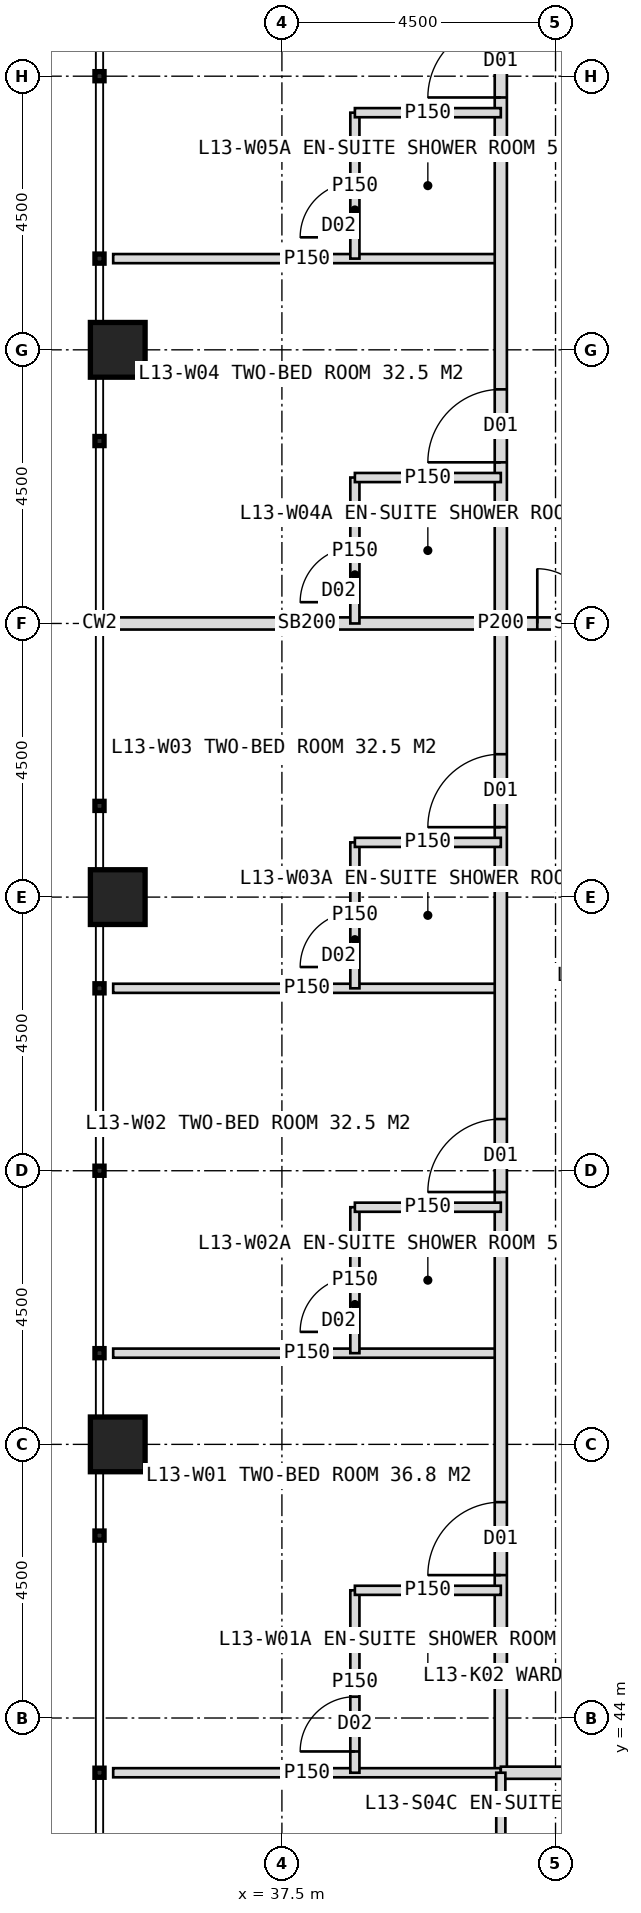
"""IFC4 building model, lengths in metres.
Left out: names, types, materials, properties, quantities, classifications, styles, units other than length and angle.
Written with IfcOpenShell. Run it as: python <this file> out.ifc"""

import sys

from ifc_helpers import new_model, si_unit, direction, frame, frame_2d, origin, origin_2d, place, context, subcontext, project, spatial, rectangle, hollow_rectangle, extrude, element, fill, save


model = new_model("IFC4")
c1 = context("Model", 3, precision=1e-05, world=origin(), true_north=direction((0.0, 1.0)))
c2 = subcontext(c1, "Body", "Model", "MODEL_VIEW")
j1 = project(units=[si_unit("LENGTHUNIT", "METRE"), si_unit("PLANEANGLEUNIT", "RADIAN")], contexts=[c1])
p1 = place(None, origin())
s1 = spatial("IfcSite", under=j1, at=p1, CompositionType="ELEMENT")
p2 = place(p1, origin())
s2 = spatial("IfcBuilding", under=s1, at=p2, CompositionType="ELEMENT")
p3 = place(p2, frame((0.0, 0.0, 59.0)))
s3 = spatial("IfcBuildingStorey", under=s2, at=p3, CompositionType="ELEMENT", Elevation=59.0)
for number, where, z_axis, x_axis in (
    (1, (34.8, 48.5, 0.0), (0.0, 0.0, 1.0), (1.0, 0.0, 0.0)),
    (2, (34.8, 57.5, 0.0), (0.0, 0.0, 1.0), (1.0, 0.0, 0.0)),
    (3, (34.8, 66.5, 0.0), (0.0, 0.0, 1.0), (1.0, 0.0, 0.0)),
):
    element("IfcColumn", number, at=place(p3, frame(where, z_axis=z_axis, x_axis=x_axis)), inside=s3, PredefinedType="COLUMN", context=c2, shape_type="SweptSolid", body=[
        extrude(hollow_rectangle(XDim=0.9, YDim=0.9, WallThickness=0.08, at=origin_2d()), origin(), (0.0, 0.0, 1.0), 4.0),
    ])
for number, where, z_axis, x_axis in (
    (4, (41.1, 50.0, 0.0), (0.0, 0.0, 1.0), (-1.0, 0.0, 0.0)),
    (5, (41.1, 56.0, 0.0), (0.0, 0.0, 1.0), (-1.0, 0.0, 0.0)),
):
    element("IfcWall", number, at=place(p3, frame(where, z_axis=z_axis, x_axis=x_axis)), inside=s3, PredefinedType="PARTITIONING", context=c2, shape_type="SweptSolid", body=[
        extrude(rectangle(XDim=6.375, YDim=0.15, at=frame_2d((3.188, 0.0))), origin(), (0.0, 0.0, 1.0), 3.75),
    ])
p4 = place(p3, frame((41.1, 62.0, 0.0), z_axis=(0.0, 0.0, 1.0), x_axis=(-1.0, 0.0, 0.0)))
e6 = element("IfcWall", 6, at=p4, inside=s3, PredefinedType="SOLIDWALL", context=c2, shape_type="SweptSolid", body=[
    extrude(rectangle(XDim=6.375, YDim=0.2, at=frame_2d((3.188, 0.0))), origin(), (0.0, 0.0, 1.0), 2.75),
])
p5 = place(p3, frame((41.1, 68.0, 0.0), z_axis=(0.0, 0.0, 1.0), x_axis=(-1.0, 0.0, 0.0)))
e7 = element("IfcWall", 7, at=p5, inside=s3, PredefinedType="PARTITIONING", context=c2, shape_type="SweptSolid", body=[
    extrude(rectangle(XDim=6.375, YDim=0.15, at=frame_2d((3.188, 0.0))), origin(), (0.0, 0.0, 1.0), 3.75),
])
p6 = place(p3, frame((41.1, 43.1, 0.0), z_axis=(0.0, 0.0, 1.0), x_axis=(0.0, 1.0, 0.0)))
e8 = element("IfcWall", 8, at=p6, inside=s3, PredefinedType="PARTITIONING", context=c2, shape_type="SweptSolid", body=[
    extrude(rectangle(XDim=37.8, YDim=0.2, at=frame_2d((18.9, 0.0))), origin(), (0.0, 0.0, 1.0), 3.75),
])
p7 = place(p6, frame((3.25, 0.0, 0.0)))
e9 = element("IfcOpeningElement", 9, at=p7, cuts=e8, PredefinedType="OPENING", context=c2, shape_type="SweptSolid", body=[
    extrude(rectangle(XDim=1.2, YDim=2.2, at=frame_2d((0.6, 1.1))), frame((0.0, 0.11, 0.0), z_axis=(0.0, -1.0, 0.0), x_axis=(1.0, 0.0, 0.0)), (0.0, 0.0, 1.0), 0.22),
])
p8 = place(p6, frame((9.55, 0.0, 0.0)))
e10 = element("IfcOpeningElement", 10, at=p8, cuts=e8, PredefinedType="OPENING", context=c2, shape_type="SweptSolid", body=[
    extrude(rectangle(XDim=1.2, YDim=2.2, at=frame_2d((0.6, 1.1))), frame((0.0, 0.11, 0.0), z_axis=(0.0, -1.0, 0.0), x_axis=(1.0, 0.0, 0.0)), (0.0, 0.0, 1.0), 0.22),
])
p9 = place(p6, frame((15.55, 0.0, 0.0)))
e11 = element("IfcOpeningElement", 11, at=p9, cuts=e8, PredefinedType="OPENING", context=c2, shape_type="SweptSolid", body=[
    extrude(rectangle(XDim=1.2, YDim=2.2, at=frame_2d((0.6, 1.1))), frame((0.0, 0.11, 0.0), z_axis=(0.0, -1.0, 0.0), x_axis=(1.0, 0.0, 0.0)), (0.0, 0.0, 1.0), 0.22),
])
p10 = place(p6, frame((21.55, 0.0, 0.0)))
e12 = element("IfcOpeningElement", 12, at=p10, cuts=e8, PredefinedType="OPENING", context=c2, shape_type="SweptSolid", body=[
    extrude(rectangle(XDim=1.2, YDim=2.2, at=frame_2d((0.6, 1.1))), frame((0.0, 0.11, 0.0), z_axis=(0.0, -1.0, 0.0), x_axis=(1.0, 0.0, 0.0)), (0.0, 0.0, 1.0), 0.22),
])
p11 = place(p6, frame((27.55, 0.0, 0.0)))
e13 = element("IfcOpeningElement", 13, at=p11, cuts=e8, PredefinedType="OPENING", context=c2, shape_type="SweptSolid", body=[
    extrude(rectangle(XDim=1.2, YDim=2.2, at=frame_2d((0.6, 1.1))), frame((0.0, 0.11, 0.0), z_axis=(0.0, -1.0, 0.0), x_axis=(1.0, 0.0, 0.0)), (0.0, 0.0, 1.0), 0.22),
])
p12 = place(p3, frame((41.1, 43.1, 0.0), z_axis=(0.0, 0.0, 1.0), x_axis=(-1.0, 0.0, 0.0)))
e14 = element("IfcWall", 14, at=p12, inside=s3, PredefinedType="PARTITIONING", context=c2, shape_type="SweptSolid", body=[
    extrude(rectangle(XDim=6.375, YDim=0.15, at=frame_2d((3.188, 0.0))), origin(), (0.0, 0.0, 1.0), 3.75),
])
p13 = place(p3, frame((38.7, 43.1, 0.0), z_axis=(0.0, 0.0, 1.0), x_axis=(0.0, 1.0, 0.0)))
e15 = element("IfcWall", 15, at=p13, inside=s3, PredefinedType="PARTITIONING", context=c2, shape_type="SweptSolid", body=[
    extrude(rectangle(XDim=3.0, YDim=0.15, at=frame_2d((1.5, 0.0))), origin(), (0.0, 0.0, 1.0), 3.75),
])
p14 = place(p13, frame((0.35, 0.0, 0.0)))
e16 = element("IfcOpeningElement", 16, at=p14, cuts=e15, PredefinedType="OPENING", context=c2, shape_type="SweptSolid", body=[
    extrude(rectangle(XDim=0.9, YDim=2.1, at=frame_2d((0.45, 1.05))), frame((0.0, 0.085, 0.0), z_axis=(0.0, -1.0, 0.0), x_axis=(1.0, 0.0, 0.0)), (0.0, 0.0, 1.0), 0.17),
])
p15 = place(p3, frame((41.1, 46.1, 0.0), z_axis=(0.0, 0.0, 1.0), x_axis=(-1.0, 0.0, 0.0)))
e17 = element("IfcWall", 17, at=p15, inside=s3, PredefinedType="PARTITIONING", context=c2, shape_type="SweptSolid", body=[
    extrude(rectangle(XDim=2.4, YDim=0.15, at=frame_2d((1.2, 0.0))), origin(), (0.0, 0.0, 1.0), 3.75),
])
p16 = place(p3, frame((38.7, 50.0, 0.0), z_axis=(0.0, 0.0, 1.0), x_axis=(0.0, 1.0, 0.0)))
e18 = element("IfcWall", 18, at=p16, inside=s3, PredefinedType="PARTITIONING", context=c2, shape_type="SweptSolid", body=[
    extrude(rectangle(XDim=2.4, YDim=0.15, at=frame_2d((1.2, 0.0))), origin(), (0.0, 0.0, 1.0), 3.75),
])
p17 = place(p16, frame((0.35, 0.0, 0.0)))
e19 = element("IfcOpeningElement", 19, at=p17, cuts=e18, PredefinedType="OPENING", context=c2, shape_type="SweptSolid", body=[
    extrude(rectangle(XDim=0.9, YDim=2.1, at=frame_2d((0.45, 1.05))), frame((0.0, 0.085, 0.0), z_axis=(0.0, -1.0, 0.0), x_axis=(1.0, 0.0, 0.0)), (0.0, 0.0, 1.0), 0.17),
])
p18 = place(p3, frame((41.1, 52.4, 0.0), z_axis=(0.0, 0.0, 1.0), x_axis=(-1.0, 0.0, 0.0)))
e20 = element("IfcWall", 20, at=p18, inside=s3, PredefinedType="PARTITIONING", context=c2, shape_type="SweptSolid", body=[
    extrude(rectangle(XDim=2.4, YDim=0.15, at=frame_2d((1.2, 0.0))), origin(), (0.0, 0.0, 1.0), 3.75),
])
p19 = place(p3, frame((38.7, 56.0, 0.0), z_axis=(0.0, 0.0, 1.0), x_axis=(0.0, 1.0, 0.0)))
e21 = element("IfcWall", 21, at=p19, inside=s3, PredefinedType="PARTITIONING", context=c2, shape_type="SweptSolid", body=[
    extrude(rectangle(XDim=2.4, YDim=0.15, at=frame_2d((1.2, 0.0))), origin(), (0.0, 0.0, 1.0), 3.75),
])
p20 = place(p19, frame((0.35, 0.0, 0.0)))
e22 = element("IfcOpeningElement", 22, at=p20, cuts=e21, PredefinedType="OPENING", context=c2, shape_type="SweptSolid", body=[
    extrude(rectangle(XDim=0.9, YDim=2.1, at=frame_2d((0.45, 1.05))), frame((0.0, 0.085, 0.0), z_axis=(0.0, -1.0, 0.0), x_axis=(1.0, 0.0, 0.0)), (0.0, 0.0, 1.0), 0.17),
])
p21 = place(p3, frame((41.1, 58.4, 0.0), z_axis=(0.0, 0.0, 1.0), x_axis=(-1.0, 0.0, 0.0)))
e23 = element("IfcWall", 23, at=p21, inside=s3, PredefinedType="PARTITIONING", context=c2, shape_type="SweptSolid", body=[
    extrude(rectangle(XDim=2.4, YDim=0.15, at=frame_2d((1.2, 0.0))), origin(), (0.0, 0.0, 1.0), 3.75),
])
p22 = place(p3, frame((38.7, 62.0, 0.0), z_axis=(0.0, 0.0, 1.0), x_axis=(0.0, 1.0, 0.0)))
e24 = element("IfcWall", 24, at=p22, inside=s3, PredefinedType="PARTITIONING", context=c2, shape_type="SweptSolid", body=[
    extrude(rectangle(XDim=2.4, YDim=0.15, at=frame_2d((1.2, 0.0))), origin(), (0.0, 0.0, 1.0), 3.75),
])
p23 = place(p22, frame((0.35, 0.0, 0.0)))
e25 = element("IfcOpeningElement", 25, at=p23, cuts=e24, PredefinedType="OPENING", context=c2, shape_type="SweptSolid", body=[
    extrude(rectangle(XDim=0.9, YDim=2.1, at=frame_2d((0.45, 1.05))), frame((0.0, 0.085, 0.0), z_axis=(0.0, -1.0, 0.0), x_axis=(1.0, 0.0, 0.0)), (0.0, 0.0, 1.0), 0.17),
])
p24 = place(p3, frame((41.1, 64.4, 0.0), z_axis=(0.0, 0.0, 1.0), x_axis=(-1.0, 0.0, 0.0)))
e26 = element("IfcWall", 26, at=p24, inside=s3, PredefinedType="PARTITIONING", context=c2, shape_type="SweptSolid", body=[
    extrude(rectangle(XDim=2.4, YDim=0.15, at=frame_2d((1.2, 0.0))), origin(), (0.0, 0.0, 1.0), 3.75),
])
p25 = place(p3, frame((38.7, 68.0, 0.0), z_axis=(0.0, 0.0, 1.0), x_axis=(0.0, 1.0, 0.0)))
e27 = element("IfcWall", 27, at=p25, inside=s3, PredefinedType="PARTITIONING", context=c2, shape_type="SweptSolid", body=[
    extrude(rectangle(XDim=2.4, YDim=0.15, at=frame_2d((1.2, 0.0))), origin(), (0.0, 0.0, 1.0), 3.75),
])
p26 = place(p25, frame((0.35, 0.0, 0.0)))
e28 = element("IfcOpeningElement", 28, at=p26, cuts=e27, PredefinedType="OPENING", context=c2, shape_type="SweptSolid", body=[
    extrude(rectangle(XDim=0.9, YDim=2.1, at=frame_2d((0.45, 1.05))), frame((0.0, 0.085, 0.0), z_axis=(0.0, -1.0, 0.0), x_axis=(1.0, 0.0, 0.0)), (0.0, 0.0, 1.0), 0.17),
])
p27 = place(p3, frame((41.1, 70.4, 0.0), z_axis=(0.0, 0.0, 1.0), x_axis=(-1.0, 0.0, 0.0)))
e29 = element("IfcWall", 29, at=p27, inside=s3, PredefinedType="PARTITIONING", context=c2, shape_type="SweptSolid", body=[
    extrude(rectangle(XDim=2.4, YDim=0.15, at=frame_2d((1.2, 0.0))), origin(), (0.0, 0.0, 1.0), 3.75),
])
p28 = place(p3, frame((78.9, 43.1, 0.0), z_axis=(0.0, 0.0, 1.0), x_axis=(-1.0, 0.0, 0.0)))
e30 = element("IfcWall", 30, at=p28, inside=s3, PredefinedType="PARTITIONING", context=c2, shape_type="SweptSolid", body=[
    extrude(rectangle(XDim=37.8, YDim=0.2, at=frame_2d((18.9, 0.0))), origin(), (0.0, 0.0, 1.0), 3.75),
])
p29 = place(p28, frame((2.65, 0.0, 0.0)))
e31 = element("IfcOpeningElement", 31, at=p29, cuts=e30, PredefinedType="OPENING", context=c2, shape_type="SweptSolid", body=[
    extrude(rectangle(XDim=1.2, YDim=2.2, at=frame_2d((0.6, 1.1))), frame((0.0, 0.11, 0.0), z_axis=(0.0, -1.0, 0.0), x_axis=(1.0, 0.0, 0.0)), (0.0, 0.0, 1.0), 0.22),
])
p30 = place(p28, frame((12.55, 0.0, 0.0)))
e32 = element("IfcOpeningElement", 32, at=p30, cuts=e30, PredefinedType="OPENING", context=c2, shape_type="SweptSolid", body=[
    extrude(rectangle(XDim=1.2, YDim=2.2, at=frame_2d((0.6, 1.1))), frame((0.0, 0.11, 0.0), z_axis=(0.0, -1.0, 0.0), x_axis=(1.0, 0.0, 0.0)), (0.0, 0.0, 1.0), 0.22),
])
p31 = place(p28, frame((21.55, 0.0, 0.0)))
e33 = element("IfcOpeningElement", 33, at=p31, cuts=e30, PredefinedType="OPENING", context=c2, shape_type="SweptSolid", body=[
    extrude(rectangle(XDim=1.2, YDim=2.2, at=frame_2d((0.6, 1.1))), frame((0.0, 0.11, 0.0), z_axis=(0.0, -1.0, 0.0), x_axis=(1.0, 0.0, 0.0)), (0.0, 0.0, 1.0), 0.22),
])
p32 = place(p28, frame((30.55, 0.0, 0.0)))
e34 = element("IfcOpeningElement", 34, at=p32, cuts=e30, PredefinedType="OPENING", context=c2, shape_type="SweptSolid", body=[
    extrude(rectangle(XDim=1.2, YDim=2.2, at=frame_2d((0.6, 1.1))), frame((0.0, 0.11, 0.0), z_axis=(0.0, -1.0, 0.0), x_axis=(1.0, 0.0, 0.0)), (0.0, 0.0, 1.0), 0.22),
])
p33 = place(p3, frame((41.1, 43.1, 0.0), z_axis=(0.0, 0.0, 1.0), x_axis=(0.0, -1.0, 0.0)))
e35 = element("IfcWall", 35, at=p33, inside=s3, PredefinedType="PARTITIONING", context=c2, shape_type="SweptSolid", body=[
    extrude(rectangle(XDim=2.4, YDim=0.15, at=frame_2d((1.2, 0.0))), origin(), (0.0, 0.0, 1.0), 3.75),
])
p34 = place(p3, frame((43.8, 62.0, 0.0), z_axis=(0.0, 0.0, 1.0), x_axis=(-1.0, 0.0, 0.0)))
e36 = element("IfcWall", 36, at=p34, inside=s3, PredefinedType="SOLIDWALL", context=c2, shape_type="SweptSolid", body=[
    extrude(rectangle(XDim=2.7, YDim=0.2, at=frame_2d((1.35, 0.0))), origin(), (0.0, 0.0, 1.0), 2.75),
])
p35 = place(p34, frame((0.3, 0.0, 0.0)))
e37 = element("IfcOpeningElement", 37, at=p35, cuts=e36, PredefinedType="OPENING", context=c2, shape_type="SweptSolid", body=[
    extrude(rectangle(XDim=1.8, YDim=2.2, at=frame_2d((0.9, 1.1))), frame((0.0, 0.11, 0.0), z_axis=(0.0, -1.0, 0.0), x_axis=(1.0, 0.0, 0.0)), (0.0, 0.0, 1.0), 0.22),
])
p36 = place(p7, origin())
e38 = element("IfcDoor", 38, at=p36, inside=s3, OperationType="SINGLE_SWING_LEFT", PredefinedType="DOOR", context=c2, shape_type="SweptSolid", body=[
    extrude(rectangle(XDim=1.2, YDim=2.2, at=frame_2d((0.6, 1.1))), frame((0.0, 0.025, 0.0), z_axis=(0.0, -1.0, 0.0), x_axis=(1.0, 0.0, 0.0)), (0.0, 0.0, 1.0), 0.05),
])
fill(e9, e38)
p37 = place(p14, origin())
e39 = element("IfcDoor", 39, at=p37, inside=s3, OperationType="SINGLE_SWING_LEFT", PredefinedType="DOOR", context=c2, shape_type="SweptSolid", body=[
    extrude(rectangle(XDim=0.9, YDim=2.1, at=frame_2d((0.45, 1.05))), frame((0.0, 0.025, 0.0), z_axis=(0.0, -1.0, 0.0), x_axis=(1.0, 0.0, 0.0)), (0.0, 0.0, 1.0), 0.05),
])
fill(e16, e39)
p38 = place(p8, origin())
e40 = element("IfcDoor", 40, at=p38, inside=s3, OperationType="SINGLE_SWING_LEFT", PredefinedType="DOOR", context=c2, shape_type="SweptSolid", body=[
    extrude(rectangle(XDim=1.2, YDim=2.2, at=frame_2d((0.6, 1.1))), frame((0.0, 0.025, 0.0), z_axis=(0.0, -1.0, 0.0), x_axis=(1.0, 0.0, 0.0)), (0.0, 0.0, 1.0), 0.05),
])
fill(e10, e40)
p39 = place(p17, origin())
e41 = element("IfcDoor", 41, at=p39, inside=s3, OperationType="SINGLE_SWING_LEFT", PredefinedType="DOOR", context=c2, shape_type="SweptSolid", body=[
    extrude(rectangle(XDim=0.9, YDim=2.1, at=frame_2d((0.45, 1.05))), frame((0.0, 0.025, 0.0), z_axis=(0.0, -1.0, 0.0), x_axis=(1.0, 0.0, 0.0)), (0.0, 0.0, 1.0), 0.05),
])
fill(e19, e41)
p40 = place(p9, origin())
e42 = element("IfcDoor", 42, at=p40, inside=s3, OperationType="SINGLE_SWING_LEFT", PredefinedType="DOOR", context=c2, shape_type="SweptSolid", body=[
    extrude(rectangle(XDim=1.2, YDim=2.2, at=frame_2d((0.6, 1.1))), frame((0.0, 0.025, 0.0), z_axis=(0.0, -1.0, 0.0), x_axis=(1.0, 0.0, 0.0)), (0.0, 0.0, 1.0), 0.05),
])
fill(e11, e42)
p41 = place(p20, origin())
e43 = element("IfcDoor", 43, at=p41, inside=s3, OperationType="SINGLE_SWING_LEFT", PredefinedType="DOOR", context=c2, shape_type="SweptSolid", body=[
    extrude(rectangle(XDim=0.9, YDim=2.1, at=frame_2d((0.45, 1.05))), frame((0.0, 0.025, 0.0), z_axis=(0.0, -1.0, 0.0), x_axis=(1.0, 0.0, 0.0)), (0.0, 0.0, 1.0), 0.05),
])
fill(e22, e43)
p42 = place(p10, origin())
e44 = element("IfcDoor", 44, at=p42, inside=s3, OperationType="SINGLE_SWING_LEFT", PredefinedType="DOOR", context=c2, shape_type="SweptSolid", body=[
    extrude(rectangle(XDim=1.2, YDim=2.2, at=frame_2d((0.6, 1.1))), frame((0.0, 0.025, 0.0), z_axis=(0.0, -1.0, 0.0), x_axis=(1.0, 0.0, 0.0)), (0.0, 0.0, 1.0), 0.05),
])
fill(e12, e44)
p43 = place(p23, origin())
e45 = element("IfcDoor", 45, at=p43, inside=s3, OperationType="SINGLE_SWING_LEFT", PredefinedType="DOOR", context=c2, shape_type="SweptSolid", body=[
    extrude(rectangle(XDim=0.9, YDim=2.1, at=frame_2d((0.45, 1.05))), frame((0.0, 0.025, 0.0), z_axis=(0.0, -1.0, 0.0), x_axis=(1.0, 0.0, 0.0)), (0.0, 0.0, 1.0), 0.05),
])
fill(e25, e45)
p44 = place(p11, origin())
e46 = element("IfcDoor", 46, at=p44, inside=s3, OperationType="SINGLE_SWING_LEFT", PredefinedType="DOOR", context=c2, shape_type="SweptSolid", body=[
    extrude(rectangle(XDim=1.2, YDim=2.2, at=frame_2d((0.6, 1.1))), frame((0.0, 0.025, 0.0), z_axis=(0.0, -1.0, 0.0), x_axis=(1.0, 0.0, 0.0)), (0.0, 0.0, 1.0), 0.05),
])
fill(e13, e46)
p45 = place(p26, origin())
e47 = element("IfcDoor", 47, at=p45, inside=s3, OperationType="SINGLE_SWING_LEFT", PredefinedType="DOOR", context=c2, shape_type="SweptSolid", body=[
    extrude(rectangle(XDim=0.9, YDim=2.1, at=frame_2d((0.45, 1.05))), frame((0.0, 0.025, 0.0), z_axis=(0.0, -1.0, 0.0), x_axis=(1.0, 0.0, 0.0)), (0.0, 0.0, 1.0), 0.05),
])
fill(e28, e47)
p46 = place(p35, origin())
e48 = element("IfcDoor", 48, at=p46, inside=s3, OperationType="DOUBLE_DOOR_DOUBLE_SWING", PredefinedType="DOOR", context=c2, shape_type="SweptSolid", body=[
    extrude(rectangle(XDim=1.8, YDim=2.2, at=frame_2d((0.9, 1.1))), frame((0.0, 0.025, 0.0), z_axis=(0.0, -1.0, 0.0), x_axis=(1.0, 0.0, 0.0)), (0.0, 0.0, 1.0), 0.05),
])
fill(e37, e48)
save(model, sys.argv[1])
